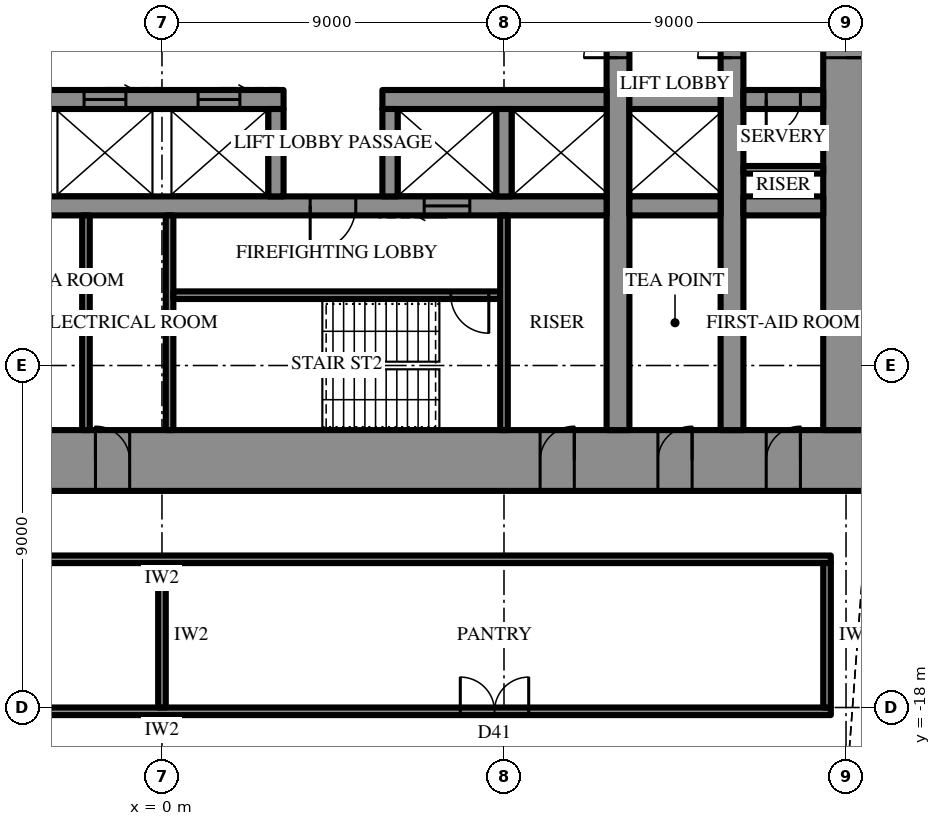
"""IFC4 building model, lengths in metres.
Left out: names, types, materials, properties, quantities, classifications, styles, units other than length and angle.
Written with IfcOpenShell. Run it as: python <this file> out.ifc"""

import sys

from ifc_helpers import new_model, si_unit, direction, frame, frame_2d, origin, place, context, subcontext, project, spatial, rectangle, extrude, element, fill, save


model = new_model("IFC4")
c1 = context("Model", 3, precision=1e-05, world=origin(), true_north=direction((0.0, 1.0)))
c2 = subcontext(c1, "Body", "Model", "MODEL_VIEW")
j1 = project(units=[si_unit("LENGTHUNIT", "METRE"), si_unit("PLANEANGLEUNIT", "RADIAN")], contexts=[c1])
p1 = place(None, origin())
s1 = spatial("IfcSite", under=j1, at=p1, CompositionType="ELEMENT")
p2 = place(p1, origin())
s2 = spatial("IfcBuilding", under=s1, at=p2, CompositionType="ELEMENT")
p3 = place(p2, frame((0.0, 0.0, 195.1)))
s3 = spatial("IfcBuildingStorey", under=s2, at=p3, CompositionType="ELEMENT", Elevation=195.1)
p4 = place(p3, frame((18.6, -11.5, 0.0), z_axis=(0.0, 0.0, 1.0), x_axis=(-1.0, 0.0, 0.0)))
e1 = element("IfcWall", 1, at=p4, inside=s3, PredefinedType="SHEAR", context=c2, shape_type="SweptSolid", body=[
    extrude(rectangle(XDim=37.2, YDim=1.6, at=frame_2d((18.6, 0.0))), origin(), (0.0, 0.0, 1.0), 4.2),
])
p5 = place(p4, frame((19.45, 0.0, 0.0)))
e2 = element("IfcOpeningElement", 2, at=p5, cuts=e1, PredefinedType="OPENING", context=c2, shape_type="SweptSolid", body=[
    extrude(rectangle(XDim=0.9, YDim=2.2, at=frame_2d((0.45, 1.1))), frame((0.0, 0.81, 0.0), z_axis=(0.0, -1.0, 0.0), x_axis=(1.0, 0.0, 0.0)), (0.0, 0.0, 1.0), 1.62),
])
p6 = place(p4, frame((22.45, 0.0, 0.0)))
e3 = element("IfcOpeningElement", 3, at=p6, cuts=e1, PredefinedType="OPENING", context=c2, shape_type="SweptSolid", body=[
    extrude(rectangle(XDim=0.9, YDim=2.2, at=frame_2d((0.45, 1.1))), frame((0.0, 0.81, 0.0), z_axis=(0.0, -1.0, 0.0), x_axis=(1.0, 0.0, 0.0)), (0.0, 0.0, 1.0), 1.62),
])
p7 = place(p4, frame((25.5, 0.0, 0.0)))
e4 = element("IfcOpeningElement", 4, at=p7, cuts=e1, PredefinedType="OPENING", context=c2, shape_type="SweptSolid", body=[
    extrude(rectangle(XDim=1.0, YDim=2.2, at=frame_2d((0.5, 1.1))), frame((0.0, 0.81, 0.0), z_axis=(0.0, -1.0, 0.0), x_axis=(1.0, 0.0, 0.0)), (0.0, 0.0, 1.0), 1.62),
])
p8 = place(p4, frame((1.8, 0.0, 0.0)))
e5 = element("IfcOpeningElement", 5, at=p8, cuts=e1, PredefinedType="OPENING", context=c2, shape_type="SweptSolid", body=[
    extrude(rectangle(XDim=0.9, YDim=2.2, at=frame_2d((0.45, 1.1))), frame((0.0, 0.81, 0.0), z_axis=(0.0, -1.0, 0.0), x_axis=(1.0, 0.0, 0.0)), (0.0, 0.0, 1.0), 1.62),
])
p9 = place(p4, frame((4.65, 0.0, 0.0)))
e6 = element("IfcOpeningElement", 6, at=p9, cuts=e1, PredefinedType="OPENING", context=c2, shape_type="SweptSolid", body=[
    extrude(rectangle(XDim=0.9, YDim=2.2, at=frame_2d((0.45, 1.1))), frame((0.0, 0.81, 0.0), z_axis=(0.0, -1.0, 0.0), x_axis=(1.0, 0.0, 0.0)), (0.0, 0.0, 1.0), 1.62),
])
p10 = place(p4, frame((7.75, 0.0, 0.0)))
e7 = element("IfcOpeningElement", 7, at=p10, cuts=e1, PredefinedType="OPENING", context=c2, shape_type="SweptSolid", body=[
    extrude(rectangle(XDim=0.9, YDim=2.2, at=frame_2d((0.45, 1.1))), frame((0.0, 0.81, 0.0), z_axis=(0.0, -1.0, 0.0), x_axis=(1.0, 0.0, 0.0)), (0.0, 0.0, 1.0), 1.62),
])
p11 = place(p4, frame((28.55, 0.0, 0.0)))
e8 = element("IfcOpeningElement", 8, at=p11, cuts=e1, PredefinedType="OPENING", context=c2, shape_type="SweptSolid", body=[
    extrude(rectangle(XDim=0.9, YDim=2.2, at=frame_2d((0.45, 1.1))), frame((0.0, 0.81, 0.0), z_axis=(0.0, -1.0, 0.0), x_axis=(1.0, 0.0, 0.0)), (0.0, 0.0, 1.0), 1.62),
])
p12 = place(p4, frame((31.65, 0.0, 0.0)))
e9 = element("IfcOpeningElement", 9, at=p12, cuts=e1, PredefinedType="OPENING", context=c2, shape_type="SweptSolid", body=[
    extrude(rectangle(XDim=0.9, YDim=2.2, at=frame_2d((0.45, 1.1))), frame((0.0, 0.81, 0.0), z_axis=(0.0, -1.0, 0.0), x_axis=(1.0, 0.0, 0.0)), (0.0, 0.0, 1.0), 1.62),
])
p13 = place(p4, frame((34.5, 0.0, 0.0)))
e10 = element("IfcOpeningElement", 10, at=p13, cuts=e1, PredefinedType="OPENING", context=c2, shape_type="SweptSolid", body=[
    extrude(rectangle(XDim=0.9, YDim=2.2, at=frame_2d((0.45, 1.1))), frame((0.0, 0.81, 0.0), z_axis=(0.0, -1.0, 0.0), x_axis=(1.0, 0.0, 0.0)), (0.0, 0.0, 1.0), 1.62),
])
p14 = place(p3, frame((18.0, -10.7, 0.0), z_axis=(0.0, 0.0, 1.0), x_axis=(0.0, 1.0, 0.0)))
e11 = element("IfcWall", 11, at=p14, inside=s3, PredefinedType="SHEAR", context=c2, shape_type="SweptSolid", body=[
    extrude(rectangle(XDim=21.4, YDim=1.2, at=frame_2d((10.7, 0.0))), origin(), (0.0, 0.0, 1.0), 4.2),
])
p15 = place(p14, frame((9.8, 0.0, 0.0)))
e12 = element("IfcOpeningElement", 12, at=p15, cuts=e11, PredefinedType="OPENING", context=c2, shape_type="SweptSolid", body=[
    extrude(rectangle(XDim=1.8, YDim=2.4, at=frame_2d((0.9, 1.2))), frame((0.0, 0.61, 0.0), z_axis=(0.0, -1.0, 0.0), x_axis=(1.0, 0.0, 0.0)), (0.0, 0.0, 1.0), 1.22),
])
p16 = place(p3, frame((12.0, -10.7, 0.0), z_axis=(0.0, 0.0, 1.0), x_axis=(0.0, 1.0, 0.0)))
e13 = element("IfcWall", 13, at=p16, inside=s3, PredefinedType="SHEAR", context=c2, shape_type="SweptSolid", body=[
    extrude(rectangle(XDim=21.4, YDim=0.6, at=frame_2d((10.7, 0.0))), origin(), (0.0, 0.0, 1.0), 4.2),
])
p17 = place(p16, frame((9.8, 0.0, 0.0)))
e14 = element("IfcOpeningElement", 14, at=p17, cuts=e13, PredefinedType="OPENING", context=c2, shape_type="SweptSolid", body=[
    extrude(rectangle(XDim=1.8, YDim=2.4, at=frame_2d((0.9, 1.2))), frame((0.0, 0.31, 0.0), z_axis=(0.0, -1.0, 0.0), x_axis=(1.0, 0.0, 0.0)), (0.0, 0.0, 1.0), 0.62),
])
p18 = place(p3, frame((15.0, -10.7, 0.0), z_axis=(0.0, 0.0, 1.0), x_axis=(0.0, 1.0, 0.0)))
e15 = element("IfcWall", 15, at=p18, inside=s3, PredefinedType="SHEAR", context=c2, shape_type="SweptSolid", body=[
    extrude(rectangle(XDim=21.4, YDim=0.6, at=frame_2d((10.7, 0.0))), origin(), (0.0, 0.0, 1.0), 4.2),
])
p19 = place(p18, frame((9.8, 0.0, 0.0)))
e16 = element("IfcOpeningElement", 16, at=p19, cuts=e15, PredefinedType="OPENING", context=c2, shape_type="SweptSolid", body=[
    extrude(rectangle(XDim=1.8, YDim=2.4, at=frame_2d((0.9, 1.2))), frame((0.0, 0.31, 0.0), z_axis=(0.0, -1.0, 0.0), x_axis=(1.0, 0.0, 0.0)), (0.0, 0.0, 1.0), 0.62),
])
p20 = place(p3, frame((17.4, -2.0, 0.0), z_axis=(0.0, 0.0, 1.0), x_axis=(-1.0, 0.0, 0.0)))
e17 = element("IfcWall", 17, at=p20, inside=s3, PredefinedType="SHEAR", context=c2, shape_type="SweptSolid", body=[
    extrude(rectangle(XDim=2.1, YDim=0.5, at=frame_2d((1.05, 0.0))), origin(), (0.0, 0.0, 1.0), 4.2),
])
p21 = place(p20, frame((0.6, 0.0, 0.0)))
e18 = element("IfcOpeningElement", 18, at=p21, cuts=e17, PredefinedType="OPENING", context=c2, shape_type="SweptSolid", body=[
    extrude(rectangle(XDim=0.9, YDim=2.2, at=frame_2d((0.45, 1.1))), frame((0.0, 0.26, 0.0), z_axis=(0.0, -1.0, 0.0), x_axis=(1.0, 0.0, 0.0)), (0.0, 0.0, 1.0), 0.52),
])
p22 = place(p3, frame((14.7, -2.0, 0.0), z_axis=(0.0, 0.0, 1.0), x_axis=(-1.0, 0.0, 0.0)))
e19 = element("IfcWall", 19, at=p22, inside=s3, PredefinedType="SHEAR", context=c2, shape_type="SweptSolid", body=[
    extrude(rectangle(XDim=2.4, YDim=0.5, at=frame_2d((1.2, 0.0))), origin(), (0.0, 0.0, 1.0), 4.2),
])
p23 = place(p3, frame((11.7, -2.0, 0.0), z_axis=(0.0, 0.0, 1.0), x_axis=(-1.0, 0.0, 0.0)))
e20 = element("IfcWall", 20, at=p23, inside=s3, PredefinedType="SHEAR", context=c2, shape_type="SweptSolid", body=[
    extrude(rectangle(XDim=5.9, YDim=0.5, at=frame_2d((2.95, 0.0))), origin(), (0.0, 0.0, 1.0), 4.2),
])
p24 = place(p3, frame((3.2, -2.0, 0.0), z_axis=(0.0, 0.0, 1.0), x_axis=(-1.0, 0.0, 0.0)))
e21 = element("IfcWall", 21, at=p24, inside=s3, PredefinedType="SHEAR", context=c2, shape_type="SweptSolid", body=[
    extrude(rectangle(XDim=14.9, YDim=0.5, at=frame_2d((7.45, 0.0))), origin(), (0.0, 0.0, 1.0), 4.2),
])
p25 = place(p24, frame((1.15, 0.0, 0.0)))
e22 = element("IfcOpeningElement", 22, at=p25, cuts=e21, PredefinedType="OPENING", context=c2, shape_type="SweptSolid", body=[
    extrude(rectangle(XDim=1.1, YDim=2.2, at=frame_2d((0.55, 1.1))), frame((0.0, 0.26, 0.0), z_axis=(0.0, -1.0, 0.0), x_axis=(1.0, 0.0, 0.0)), (0.0, 0.0, 1.0), 0.52),
])
p26 = place(p24, frame((4.15, 0.0, 0.0)))
e23 = element("IfcOpeningElement", 23, at=p26, cuts=e21, PredefinedType="OPENING", context=c2, shape_type="SweptSolid", body=[
    extrude(rectangle(XDim=1.1, YDim=2.2, at=frame_2d((0.55, 1.1))), frame((0.0, 0.26, 0.0), z_axis=(0.0, -1.0, 0.0), x_axis=(1.0, 0.0, 0.0)), (0.0, 0.0, 1.0), 0.52),
])
p27 = place(p24, frame((7.15, 0.0, 0.0)))
e24 = element("IfcOpeningElement", 24, at=p27, cuts=e21, PredefinedType="OPENING", context=c2, shape_type="SweptSolid", body=[
    extrude(rectangle(XDim=1.1, YDim=2.2, at=frame_2d((0.55, 1.1))), frame((0.0, 0.26, 0.0), z_axis=(0.0, -1.0, 0.0), x_axis=(1.0, 0.0, 0.0)), (0.0, 0.0, 1.0), 0.52),
])
p28 = place(p24, frame((10.15, 0.0, 0.0)))
e25 = element("IfcOpeningElement", 25, at=p28, cuts=e21, PredefinedType="OPENING", context=c2, shape_type="SweptSolid", body=[
    extrude(rectangle(XDim=1.1, YDim=2.2, at=frame_2d((0.55, 1.1))), frame((0.0, 0.26, 0.0), z_axis=(0.0, -1.0, 0.0), x_axis=(1.0, 0.0, 0.0)), (0.0, 0.0, 1.0), 0.52),
])
p29 = place(p3, frame((17.4, -4.8, 0.0), z_axis=(0.0, 0.0, 1.0), x_axis=(-1.0, 0.0, 0.0)))
e26 = element("IfcWall", 26, at=p29, inside=s3, PredefinedType="SHEAR", context=c2, shape_type="SweptSolid", body=[
    extrude(rectangle(XDim=2.1, YDim=0.5, at=frame_2d((1.05, 0.0))), origin(), (0.0, 0.0, 1.0), 4.2),
])
p30 = place(p3, frame((14.7, -4.8, 0.0), z_axis=(0.0, 0.0, 1.0), x_axis=(-1.0, 0.0, 0.0)))
e27 = element("IfcWall", 27, at=p30, inside=s3, PredefinedType="SHEAR", context=c2, shape_type="SweptSolid", body=[
    extrude(rectangle(XDim=2.4, YDim=0.5, at=frame_2d((1.2, 0.0))), origin(), (0.0, 0.0, 1.0), 4.2),
])
p31 = place(p3, frame((11.7, -4.8, 0.0), z_axis=(0.0, 0.0, 1.0), x_axis=(-1.0, 0.0, 0.0)))
e28 = element("IfcWall", 28, at=p31, inside=s3, PredefinedType="SHEAR", context=c2, shape_type="SweptSolid", body=[
    extrude(rectangle(XDim=23.4, YDim=0.5, at=frame_2d((11.7, 0.0))), origin(), (0.0, 0.0, 1.0), 4.2),
])
p32 = place(p31, frame((6.6, 0.0, 0.0)))
e29 = element("IfcOpeningElement", 29, at=p32, cuts=e28, PredefinedType="OPENING", context=c2, shape_type="SweptSolid", body=[
    extrude(rectangle(XDim=1.2, YDim=2.2, at=frame_2d((0.6, 1.1))), frame((0.0, 0.26, 0.0), z_axis=(0.0, -1.0, 0.0), x_axis=(1.0, 0.0, 0.0)), (0.0, 0.0, 1.0), 0.52),
])
p33 = place(p31, frame((3.6, 0.0, 0.0)))
e30 = element("IfcOpeningElement", 30, at=p33, cuts=e28, PredefinedType="OPENING", context=c2, shape_type="SweptSolid", body=[
    extrude(rectangle(XDim=1.2, YDim=2.2, at=frame_2d((0.6, 1.1))), frame((0.0, 0.26, 0.0), z_axis=(0.0, -1.0, 0.0), x_axis=(1.0, 0.0, 0.0)), (0.0, 0.0, 1.0), 0.52),
])
for number, where, z_axis, x_axis in (
    (31, (9.0, -2.25, 0.0), (0.0, 0.0, 1.0), (0.0, -1.0, 0.0)),
    (32, (6.0, -2.25, 0.0), (0.0, 0.0, 1.0), (0.0, -1.0, 0.0)),
    (33, (3.0, -2.25, 0.0), (0.0, 0.0, 1.0), (0.0, -1.0, 0.0)),
):
    element("IfcWall", number, at=place(p3, frame(where, z_axis=z_axis, x_axis=x_axis)), inside=s3, PredefinedType="SHEAR", context=c2, shape_type="SweptSolid", body=[
        extrude(rectangle(XDim=2.3, YDim=0.4, at=frame_2d((1.15, 0.0))), origin(), (0.0, 0.0, 1.0), 4.2),
    ])
p34 = place(p3, frame((0.2, -5.05, 0.0), z_axis=(0.0, 0.0, 1.0), x_axis=(0.0, -1.0, 0.0)))
e34 = element("IfcWall", 34, at=p34, inside=s3, PredefinedType="SHEAR", context=c2, shape_type="SweptSolid", body=[
    extrude(rectangle(XDim=5.65, YDim=0.2, at=frame_2d((2.825, 0.0))), origin(), (0.0, 0.0, 1.0), 4.2),
])
p35 = place(p3, frame((8.9, -7.15, 0.0), z_axis=(0.0, 0.0, 1.0), x_axis=(-1.0, 0.0, 0.0)))
e35 = element("IfcWall", 35, at=p35, inside=s3, PredefinedType="SHEAR", context=c2, shape_type="SweptSolid", body=[
    extrude(rectangle(XDim=8.6, YDim=0.2, at=frame_2d((4.3, 0.0))), origin(), (0.0, 0.0, 1.0), 4.2),
])
p36 = place(p35, frame((0.3, 0.0, 0.0)))
e36 = element("IfcOpeningElement", 36, at=p36, cuts=e35, PredefinedType="OPENING", context=c2, shape_type="SweptSolid", body=[
    extrude(rectangle(XDim=1.0, YDim=2.2, at=frame_2d((0.5, 1.1))), frame((0.0, 0.11, 0.0), z_axis=(0.0, -1.0, 0.0), x_axis=(1.0, 0.0, 0.0)), (0.0, 0.0, 1.0), 0.22),
])
for number, where, z_axis, x_axis in (
    (37, (9.0, -5.05, 0.0), (0.0, 0.0, 1.0), (0.0, -1.0, 0.0)),
    (38, (-2.0, -5.05, 0.0), (0.0, 0.0, 1.0), (0.0, -1.0, 0.0)),
):
    element("IfcWall", number, at=place(p3, frame(where, z_axis=z_axis, x_axis=x_axis)), inside=s3, PredefinedType="PARTITIONING", context=c2, shape_type="SweptSolid", body=[
        extrude(rectangle(XDim=5.65, YDim=0.2, at=frame_2d((2.825, 0.0))), origin(), (0.0, 0.0, 1.0), 4.0),
    ])
p37 = place(p3, frame((17.4, -3.85, 0.0), z_axis=(0.0, 0.0, 1.0), x_axis=(-1.0, 0.0, 0.0)))
e39 = element("IfcWall", 39, at=p37, inside=s3, PredefinedType="PARTITIONING", context=c2, shape_type="SweptSolid", body=[
    extrude(rectangle(XDim=2.1, YDim=0.2, at=frame_2d((1.05, 0.0))), origin(), (0.0, 0.0, 1.0), 4.0),
])
p38 = place(p3, frame((17.6, -14.1, 0.0), z_axis=(0.0, 0.0, 1.0), x_axis=(-1.0, 0.0, 0.0)))
e40 = element("IfcWall", 40, at=p38, inside=s3, PredefinedType="PARTITIONING", context=c2, shape_type="SweptSolid", body=[
    extrude(rectangle(XDim=35.2, YDim=0.2, at=frame_2d((17.6, 0.0))), origin(), (0.0, 0.0, 1.0), 4.0),
])
p39 = place(p3, frame((17.6, -18.1, 0.0), z_axis=(0.0, 0.0, 1.0), x_axis=(-1.0, 0.0, 0.0)))
e41 = element("IfcWall", 41, at=p39, inside=s3, PredefinedType="PARTITIONING", context=c2, shape_type="SweptSolid", body=[
    extrude(rectangle(XDim=35.2, YDim=0.2, at=frame_2d((17.6, 0.0))), origin(), (0.0, 0.0, 1.0), 4.0),
])
p40 = place(p39, frame((7.95, 0.0, 0.0)))
e42 = element("IfcOpeningElement", 42, at=p40, cuts=e41, PredefinedType="OPENING", context=c2, shape_type="SweptSolid", body=[
    extrude(rectangle(XDim=1.8, YDim=2.4, at=frame_2d((0.9, 1.2))), frame((0.0, 0.11, 0.0), z_axis=(0.0, -1.0, 0.0), x_axis=(1.0, 0.0, 0.0)), (0.0, 0.0, 1.0), 0.22),
])
p41 = place(p39, frame((25.45, 0.0, 0.0)))
e43 = element("IfcOpeningElement", 43, at=p41, cuts=e41, PredefinedType="OPENING", context=c2, shape_type="SweptSolid", body=[
    extrude(rectangle(XDim=1.8, YDim=2.4, at=frame_2d((0.9, 1.2))), frame((0.0, 0.11, 0.0), z_axis=(0.0, -1.0, 0.0), x_axis=(1.0, 0.0, 0.0)), (0.0, 0.0, 1.0), 0.22),
])
p42 = place(p3, frame((17.5, -14.2, 0.0), z_axis=(0.0, 0.0, 1.0), x_axis=(0.0, -1.0, 0.0)))
e44 = element("IfcWall", 44, at=p42, inside=s3, PredefinedType="PARTITIONING", context=c2, shape_type="SweptSolid", body=[
    extrude(rectangle(XDim=3.8, YDim=0.2, at=frame_2d((1.9, 0.0))), origin(), (0.0, 0.0, 1.0), 4.0),
])
p43 = place(p3, frame((0.0, -14.2, 0.0), z_axis=(0.0, 0.0, 1.0), x_axis=(0.0, -1.0, 0.0)))
e45 = element("IfcWall", 45, at=p43, inside=s3, PredefinedType="PARTITIONING", context=c2, shape_type="SweptSolid", body=[
    extrude(rectangle(XDim=3.8, YDim=0.2, at=frame_2d((1.9, 0.0))), origin(), (0.0, 0.0, 1.0), 2.992),
])
p44 = place(p15, frame((1.8, 0.0, 0.0), z_axis=(0.0, 0.0, 1.0), x_axis=(-1.0, 0.0, 0.0)))
e46 = element("IfcDoor", 46, at=p44, inside=s3, OperationType="DOUBLE_DOOR_SINGLE_SWING", PredefinedType="DOOR", context=c2, shape_type="SweptSolid", body=[
    extrude(rectangle(XDim=1.8, YDim=2.4, at=frame_2d((0.9, 1.2))), frame((0.0, 0.025, 0.0), z_axis=(0.0, -1.0, 0.0), x_axis=(1.0, 0.0, 0.0)), (0.0, 0.0, 1.0), 0.05),
])
fill(e12, e46)
p45 = place(p32, origin())
e47 = element("IfcDoor", 47, at=p45, inside=s3, OperationType="SINGLE_SWING_LEFT", PredefinedType="DOOR", context=c2, shape_type="SweptSolid", body=[
    extrude(rectangle(XDim=1.2, YDim=2.2, at=frame_2d((0.6, 1.1))), frame((0.0, 0.025, 0.0), z_axis=(0.0, -1.0, 0.0), x_axis=(1.0, 0.0, 0.0)), (0.0, 0.0, 1.0), 0.05),
])
fill(e29, e47)
p46 = place(p36, origin())
e48 = element("IfcDoor", 48, at=p46, inside=s3, OperationType="SINGLE_SWING_RIGHT", PredefinedType="DOOR", context=c2, shape_type="SweptSolid", body=[
    extrude(rectangle(XDim=1.0, YDim=2.2, at=frame_2d((0.5, 1.1))), frame((0.0, 0.025, 0.0), z_axis=(0.0, -1.0, 0.0), x_axis=(1.0, 0.0, 0.0)), (0.0, 0.0, 1.0), 0.05),
])
fill(e36, e48)
p47 = place(p5, frame((0.9, 0.0, 0.0), z_axis=(0.0, 0.0, 1.0), x_axis=(-1.0, 0.0, 0.0)))
e49 = element("IfcDoor", 49, at=p47, inside=s3, OperationType="SINGLE_SWING_RIGHT", PredefinedType="DOOR", context=c2, shape_type="SweptSolid", body=[
    extrude(rectangle(XDim=0.9, YDim=2.2, at=frame_2d((0.45, 1.1))), frame((0.0, 0.025, 0.0), z_axis=(0.0, -1.0, 0.0), x_axis=(1.0, 0.0, 0.0)), (0.0, 0.0, 1.0), 0.05),
])
fill(e2, e49)
p48 = place(p8, frame((0.9, 0.0, 0.0), z_axis=(0.0, 0.0, 1.0), x_axis=(-1.0, 0.0, 0.0)))
e50 = element("IfcDoor", 50, at=p48, inside=s3, OperationType="SINGLE_SWING_LEFT", PredefinedType="DOOR", context=c2, shape_type="SweptSolid", body=[
    extrude(rectangle(XDim=0.9, YDim=2.2, at=frame_2d((0.45, 1.1))), frame((0.0, 0.025, 0.0), z_axis=(0.0, -1.0, 0.0), x_axis=(1.0, 0.0, 0.0)), (0.0, 0.0, 1.0), 0.05),
])
fill(e5, e50)
p49 = place(p9, frame((0.9, 0.0, 0.0), z_axis=(0.0, 0.0, 1.0), x_axis=(-1.0, 0.0, 0.0)))
e51 = element("IfcDoor", 51, at=p49, inside=s3, OperationType="SINGLE_SWING_LEFT", PredefinedType="DOOR", context=c2, shape_type="SweptSolid", body=[
    extrude(rectangle(XDim=0.9, YDim=2.2, at=frame_2d((0.45, 1.1))), frame((0.0, 0.025, 0.0), z_axis=(0.0, -1.0, 0.0), x_axis=(1.0, 0.0, 0.0)), (0.0, 0.0, 1.0), 0.05),
])
fill(e6, e51)
p50 = place(p10, frame((0.9, 0.0, 0.0), z_axis=(0.0, 0.0, 1.0), x_axis=(-1.0, 0.0, 0.0)))
e52 = element("IfcDoor", 52, at=p50, inside=s3, OperationType="SINGLE_SWING_LEFT", PredefinedType="DOOR", context=c2, shape_type="SweptSolid", body=[
    extrude(rectangle(XDim=0.9, YDim=2.2, at=frame_2d((0.45, 1.1))), frame((0.0, 0.025, 0.0), z_axis=(0.0, -1.0, 0.0), x_axis=(1.0, 0.0, 0.0)), (0.0, 0.0, 1.0), 0.05),
])
fill(e7, e52)
p51 = place(p21, origin())
e53 = element("IfcDoor", 53, at=p51, inside=s3, OperationType="SINGLE_SWING_LEFT", PredefinedType="DOOR", context=c2, shape_type="SweptSolid", body=[
    extrude(rectangle(XDim=0.9, YDim=2.2, at=frame_2d((0.45, 1.1))), frame((0.0, 0.025, 0.0), z_axis=(0.0, -1.0, 0.0), x_axis=(1.0, 0.0, 0.0)), (0.0, 0.0, 1.0), 0.05),
])
fill(e18, e53)
p52 = place(p17, origin())
e54 = element("IfcDoor", 54, at=p52, inside=s3, OperationType="DOUBLE_DOOR_SINGLE_SWING", PredefinedType="DOOR", context=c2, shape_type="SweptSolid", body=[
    extrude(rectangle(XDim=1.8, YDim=2.4, at=frame_2d((0.9, 1.2))), frame((0.0, 0.025, 0.0), z_axis=(0.0, -1.0, 0.0), x_axis=(1.0, 0.0, 0.0)), (0.0, 0.0, 1.0), 0.05),
])
fill(e14, e54)
p53 = place(p19, origin())
e55 = element("IfcDoor", 55, at=p53, inside=s3, OperationType="DOUBLE_DOOR_SINGLE_SWING", PredefinedType="DOOR", context=c2, shape_type="SweptSolid", body=[
    extrude(rectangle(XDim=1.8, YDim=2.4, at=frame_2d((0.9, 1.2))), frame((0.0, 0.025, 0.0), z_axis=(0.0, -1.0, 0.0), x_axis=(1.0, 0.0, 0.0)), (0.0, 0.0, 1.0), 0.05),
])
fill(e16, e55)
p54 = place(p33, origin())
e56 = element("IfcDoor", 56, at=p54, inside=s3, OperationType="SLIDING_TO_LEFT", PredefinedType="DOOR", context=c2, shape_type="SweptSolid", body=[
    extrude(rectangle(XDim=1.2, YDim=2.2, at=frame_2d((0.6, 1.1))), frame((0.0, 0.025, 0.0), z_axis=(0.0, -1.0, 0.0), x_axis=(1.0, 0.0, 0.0)), (0.0, 0.0, 1.0), 0.05),
])
fill(e30, e56)
p55 = place(p25, frame((1.1, 0.0, 0.0), z_axis=(0.0, 0.0, 1.0), x_axis=(-1.0, 0.0, 0.0)))
e57 = element("IfcDoor", 57, at=p55, inside=s3, OperationType="SLIDING_TO_LEFT", PredefinedType="DOOR", context=c2, shape_type="SweptSolid", body=[
    extrude(rectangle(XDim=1.1, YDim=2.2, at=frame_2d((0.55, 1.1))), frame((0.0, 0.025, 0.0), z_axis=(0.0, -1.0, 0.0), x_axis=(1.0, 0.0, 0.0)), (0.0, 0.0, 1.0), 0.05),
])
fill(e22, e57)
p56 = place(p26, frame((1.1, 0.0, 0.0), z_axis=(0.0, 0.0, 1.0), x_axis=(-1.0, 0.0, 0.0)))
e58 = element("IfcDoor", 58, at=p56, inside=s3, OperationType="SLIDING_TO_LEFT", PredefinedType="DOOR", context=c2, shape_type="SweptSolid", body=[
    extrude(rectangle(XDim=1.1, YDim=2.2, at=frame_2d((0.55, 1.1))), frame((0.0, 0.025, 0.0), z_axis=(0.0, -1.0, 0.0), x_axis=(1.0, 0.0, 0.0)), (0.0, 0.0, 1.0), 0.05),
])
fill(e23, e58)
p57 = place(p40, frame((1.8, 0.0, 0.0), z_axis=(0.0, 0.0, 1.0), x_axis=(-1.0, 0.0, 0.0)))
e59 = element("IfcDoor", 59, at=p57, inside=s3, OperationType="DOUBLE_DOOR_SINGLE_SWING", PredefinedType="DOOR", context=c2, shape_type="SweptSolid", body=[
    extrude(rectangle(XDim=1.8, YDim=2.4, at=frame_2d((0.9, 1.2))), frame((0.0, 0.025, 0.0), z_axis=(0.0, -1.0, 0.0), x_axis=(1.0, 0.0, 0.0)), (0.0, 0.0, 1.0), 0.05),
])
fill(e42, e59)
save(model, sys.argv[1])
